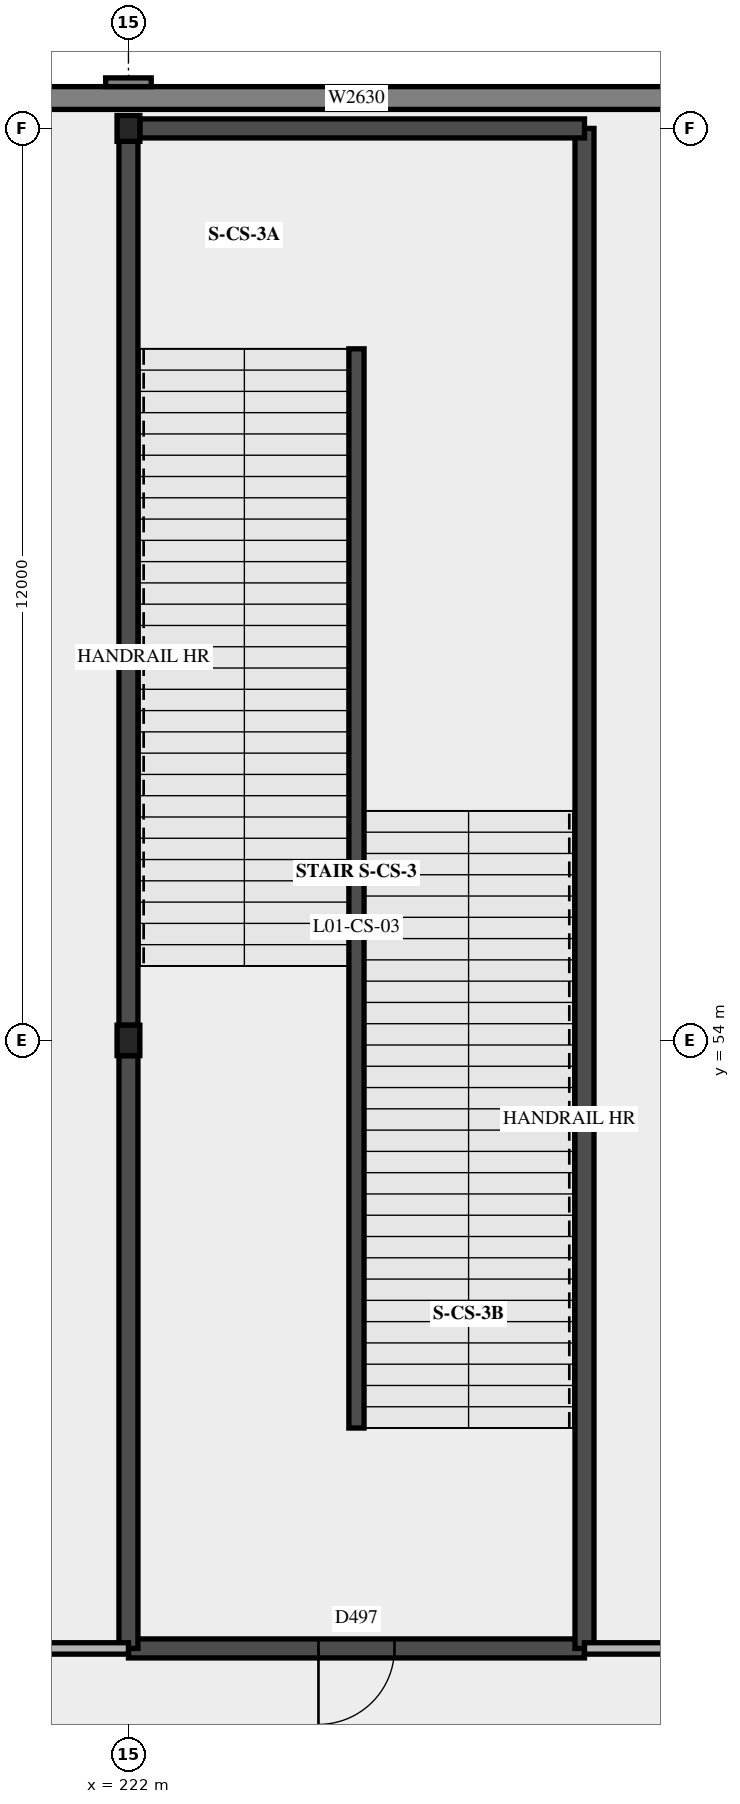
"""IFC4 building model, lengths in metres.
Left out: names, types, materials, properties, quantities, classifications, styles, units other than length and angle.
Written with IfcOpenShell. Run it as: python <this file> out.ifc"""

import sys

from ifc_helpers import new_model, si_unit, direction, frame, frame_2d, origin, origin_2d, place, context, subcontext, project, spatial, polyline, rectangle, i_section, outline, extrude, element, fill, save


model = new_model("IFC4")
c1 = context("Model", 3, precision=1e-05, world=origin(), true_north=direction((0.0, 1.0)))
c2 = subcontext(c1, "Body", "Model", "MODEL_VIEW")
j1 = project(units=[si_unit("LENGTHUNIT", "METRE"), si_unit("PLANEANGLEUNIT", "RADIAN")], contexts=[c1])
p1 = place(None, origin())
s1 = spatial("IfcSite", under=j1, at=p1, CompositionType="ELEMENT")
p2 = place(p1, origin())
s2 = spatial("IfcBuilding", under=s1, at=p2, CompositionType="ELEMENT")
p3 = place(p2, frame((0.0, 0.0, 5.4)))
s3 = spatial("IfcBuildingStorey", under=s2, at=p3, CompositionType="ELEMENT", Elevation=5.4)
p4 = place(p3, frame((222.0, 54.0, 0.0), z_axis=(0.0, 0.0, 1.0), x_axis=(1.0, 0.0, 0.0)))
e1 = element("IfcColumn", 1, at=p4, inside=s3, PredefinedType="COLUMN", context=c2, shape_type="SweptSolid", body=[
    extrude(i_section(OverallWidth=0.3, OverallDepth=0.4, WebThickness=0.013, FlangeThickness=0.024, at=origin_2d()), origin(), (0.0, 0.0, 1.0), 5.4),
])
p5 = place(p3, frame((222.0, 66.0, 0.0), z_axis=(0.0, 0.0, 1.0), x_axis=(1.0, 0.0, 0.0)))
e2 = element("IfcColumn", 2, at=p5, inside=s3, PredefinedType="COLUMN", context=c2, shape_type="SweptSolid", body=[
    extrude(i_section(OverallWidth=0.3, OverallDepth=0.34, WebThickness=0.012, FlangeThickness=0.021, at=origin_2d()), origin(), (0.0, 0.0, 1.0), 5.4),
])
p6 = place(p3, frame((222.0, 46.0, 0.0), z_axis=(0.0, 0.0, 1.0), x_axis=(1.0, 0.0, 0.0)))
e3 = element("IfcWall", 3, at=p6, inside=s3, PredefinedType="SHEAR", context=c2, shape_type="SweptSolid", body=[
    extrude(rectangle(XDim=6.0, YDim=0.25, at=frame_2d((3.0, 0.0))), origin(), (0.0, 0.0, 1.0), 5.4),
])
p7 = place(p6, frame((2.5, 0.0, 0.0)))
e4 = element("IfcOpeningElement", 4, at=p7, cuts=e3, PredefinedType="OPENING", context=c2, shape_type="SweptSolid", body=[
    extrude(rectangle(XDim=1.0, YDim=2.1, at=frame_2d((0.5, 1.05))), frame((0.0, 0.135, 0.0), z_axis=(0.0, -1.0, 0.0), x_axis=(1.0, 0.0, 0.0)), (0.0, 0.0, 1.0), 0.27),
])
p8 = place(p3, frame((228.0, 46.0, 0.0), z_axis=(0.0, 0.0, 1.0), x_axis=(0.0, 1.0, 0.0)))
e5 = element("IfcWall", 5, at=p8, inside=s3, PredefinedType="SHEAR", context=c2, shape_type="SweptSolid", body=[
    extrude(rectangle(XDim=20.0, YDim=0.25, at=frame_2d((10.0, 0.0))), origin(), (0.0, 0.0, 1.0), 5.4),
])
p9 = place(p3, frame((222.15, 66.0, 0.0), z_axis=(0.0, 0.0, 1.0), x_axis=(1.0, 0.0, 0.0)))
e6 = element("IfcWall", 6, at=p9, inside=s3, PredefinedType="SHEAR", context=c2, shape_type="SweptSolid", body=[
    extrude(rectangle(XDim=5.85, YDim=0.25, at=frame_2d((2.925, 0.0))), origin(), (0.0, 0.0, 1.0), 5.4),
])
p10 = place(p3, frame((222.0, 46.0, 0.0), z_axis=(0.0, 0.0, 1.0), x_axis=(0.0, 1.0, 0.0)))
e7 = element("IfcWall", 7, at=p10, inside=s3, PredefinedType="SHEAR", context=c2, shape_type="SweptSolid", body=[
    extrude(rectangle(XDim=7.8, YDim=0.25, at=frame_2d((3.9, 0.0))), origin(), (0.0, 0.0, 1.0), 5.4),
])
p11 = place(p3, frame((222.0, 54.2, 0.0), z_axis=(0.0, 0.0, 1.0), x_axis=(0.0, 1.0, 0.0)))
e8 = element("IfcWall", 8, at=p11, inside=s3, PredefinedType="SHEAR", context=c2, shape_type="SweptSolid", body=[
    extrude(rectangle(XDim=11.63, YDim=0.25, at=frame_2d((5.815, 0.0))), origin(), (0.0, 0.0, 1.0), 5.4),
])
p12 = place(p3, frame((282.25, 66.4, 0.0), z_axis=(0.0, 0.0, 1.0), x_axis=(-1.0, 0.0, 0.0)))
e9 = element("IfcWall", 9, at=p12, inside=s3, PredefinedType="SOLIDWALL", context=c2, shape_type="SweptSolid", body=[
    extrude(rectangle(XDim=84.5, YDim=0.3, at=frame_2d((42.25, 0.0))), origin(), (0.0, 0.0, 1.0), 5.4),
])
p13 = place(p12, frame((9.025, 0.0, 1.8)))
e10 = element("IfcOpeningElement", 10, at=p13, cuts=e9, PredefinedType="OPENING", context=c2, shape_type="SweptSolid", body=[
    extrude(rectangle(XDim=0.45, YDim=2.4, at=frame_2d((0.225, 1.2))), frame((0.0, 0.16, 0.0), z_axis=(0.0, -1.0, 0.0), x_axis=(1.0, 0.0, 0.0)), (0.0, 0.0, 1.0), 0.32),
])
p14 = place(p12, frame((21.025, 0.0, 1.8)))
e11 = element("IfcOpeningElement", 11, at=p14, cuts=e9, PredefinedType="OPENING", context=c2, shape_type="SweptSolid", body=[
    extrude(rectangle(XDim=0.45, YDim=2.4, at=frame_2d((0.225, 1.2))), frame((0.0, 0.16, 0.0), z_axis=(0.0, -1.0, 0.0), x_axis=(1.0, 0.0, 0.0)), (0.0, 0.0, 1.0), 0.32),
])
p15 = place(p12, frame((33.025, 0.0, 1.8)))
e12 = element("IfcOpeningElement", 12, at=p15, cuts=e9, PredefinedType="OPENING", context=c2, shape_type="SweptSolid", body=[
    extrude(rectangle(XDim=0.45, YDim=2.4, at=frame_2d((0.225, 1.2))), frame((0.0, 0.16, 0.0), z_axis=(0.0, -1.0, 0.0), x_axis=(1.0, 0.0, 0.0)), (0.0, 0.0, 1.0), 0.32),
])
p16 = place(p12, frame((45.025, 0.0, 1.8)))
e13 = element("IfcOpeningElement", 13, at=p16, cuts=e9, PredefinedType="OPENING", context=c2, shape_type="SweptSolid", body=[
    extrude(rectangle(XDim=0.45, YDim=2.4, at=frame_2d((0.225, 1.2))), frame((0.0, 0.16, 0.0), z_axis=(0.0, -1.0, 0.0), x_axis=(1.0, 0.0, 0.0)), (0.0, 0.0, 1.0), 0.32),
])
p17 = place(p12, frame((57.025, 0.0, 1.8)))
e14 = element("IfcOpeningElement", 14, at=p17, cuts=e9, PredefinedType="OPENING", context=c2, shape_type="SweptSolid", body=[
    extrude(rectangle(XDim=0.45, YDim=2.4, at=frame_2d((0.225, 1.2))), frame((0.0, 0.16, 0.0), z_axis=(0.0, -1.0, 0.0), x_axis=(1.0, 0.0, 0.0)), (0.0, 0.0, 1.0), 0.32),
])
p18 = place(p12, frame((69.025, 0.0, 1.8)))
e15 = element("IfcOpeningElement", 15, at=p18, cuts=e9, PredefinedType="OPENING", context=c2, shape_type="SweptSolid", body=[
    extrude(rectangle(XDim=0.45, YDim=2.4, at=frame_2d((0.225, 1.2))), frame((0.0, 0.16, 0.0), z_axis=(0.0, -1.0, 0.0), x_axis=(1.0, 0.0, 0.0)), (0.0, 0.0, 1.0), 0.32),
])
p19 = place(p12, frame((81.025, 0.0, 1.8)))
e16 = element("IfcOpeningElement", 16, at=p19, cuts=e9, PredefinedType="OPENING", context=c2, shape_type="SweptSolid", body=[
    extrude(rectangle(XDim=0.45, YDim=2.4, at=frame_2d((0.225, 1.2))), frame((0.0, 0.16, 0.0), z_axis=(0.0, -1.0, 0.0), x_axis=(1.0, 0.0, 0.0)), (0.0, 0.0, 1.0), 0.32),
])
p20 = place(p3, frame((222.3, 66.607, 0.0), z_axis=(0.0, 0.0, 1.0), x_axis=(-1.0, 0.0, 0.0)))
e17 = element("IfcWall", 17, at=p20, inside=s3, PredefinedType="SOLIDWALL", context=c2, shape_type="SweptSolid", body=[
    extrude(rectangle(XDim=0.6, YDim=0.115, at=frame_2d((0.3, 0.0))), origin(), (0.0, 0.0, 1.0), 5.4),
])
p21 = place(p3, frame((225.0, 48.9, 0.0), z_axis=(0.0, 0.0, 1.0), x_axis=(0.0, 1.0, 0.0)))
e18 = element("IfcWall", 18, at=p21, inside=s3, PredefinedType="SHEAR", context=c2, shape_type="SweptSolid", body=[
    extrude(rectangle(XDim=14.2, YDim=0.2, at=frame_2d((7.1, 0.0))), origin(), (0.0, 0.0, 1.0), 5.15),
])
p22 = place(p3, frame((210.0, 46.0, 0.0), z_axis=(0.0, 0.0, 1.0), x_axis=(1.0, 0.0, 0.0)))
e19 = element("IfcWall", 19, at=p22, inside=s3, PredefinedType="PARTITIONING", context=c2, shape_type="SweptSolid", body=[
    extrude(outline(polyline([(0.0, 0.0), (12.0, 0.0), (12.0, 5.15), (9.705, 5.15), (9.7, 4.63), (9.5, 4.63), (9.495, 5.15), (7.305, 5.15), (7.3, 4.63), (7.1, 4.63), (7.095, 5.15), (4.905, 5.15), (4.9, 4.63), (4.7, 4.63), (4.695, 5.15), (2.505, 5.15), (2.5, 4.63), (2.3, 4.63), (2.295, 5.15), (0.1, 5.15), (0.095, 4.68), (0.0, 4.68), (0.0, 0.0)])), frame((0.0, 0.075, 0.0), z_axis=(0.0, -1.0, 0.0), x_axis=(1.0, 0.0, 0.0)), (0.0, 0.0, 1.0), 0.15),
])
p23 = place(p22, frame((5.4, 0.0, 0.0)))
e20 = element("IfcOpeningElement", 20, at=p23, cuts=e19, PredefinedType="OPENING", context=c2, shape_type="SweptSolid", body=[
    extrude(rectangle(XDim=1.2, YDim=2.4, at=frame_2d((0.6, 1.2))), frame((0.0, 0.085, 0.0), z_axis=(0.0, -1.0, 0.0), x_axis=(1.0, 0.0, 0.0)), (0.0, 0.0, 1.0), 0.17),
])
p24 = place(p3, frame((228.0, 46.0, 0.0), z_axis=(0.0, 0.0, 1.0), x_axis=(1.0, 0.0, 0.0)))
e21 = element("IfcWall", 21, at=p24, inside=s3, PredefinedType="PARTITIONING", context=c2, shape_type="SweptSolid", body=[
    extrude(outline(polyline([(0.0, 0.0), (18.0, 0.0), (18.0, 5.15), (15.705, 5.15), (15.7, 4.63), (15.5, 4.63), (15.495, 5.15), (13.305, 5.15), (13.3, 4.63), (13.1, 4.63), (13.095, 5.15), (10.905, 5.15), (10.9, 4.63), (10.7, 4.63), (10.695, 5.15), (8.505, 5.15), (8.5, 4.63), (8.3, 4.63), (8.295, 5.15), (6.1, 5.15), (6.095, 4.68), (5.905, 4.68), (5.9, 5.15), (3.705, 5.15), (3.7, 4.63), (3.5, 4.63), (3.495, 5.15), (1.305, 5.15), (1.3, 4.63), (1.1, 4.63), (1.095, 5.15), (0.0, 5.15), (0.0, 0.0)])), frame((0.0, 0.075, 0.0), z_axis=(0.0, -1.0, 0.0), x_axis=(1.0, 0.0, 0.0)), (0.0, 0.0, 1.0), 0.15),
])
p25 = place(p24, frame((8.4, 0.0, 0.0)))
e22 = element("IfcOpeningElement", 22, at=p25, cuts=e21, PredefinedType="OPENING", context=c2, shape_type="SweptSolid", body=[
    extrude(rectangle(XDim=1.2, YDim=2.4, at=frame_2d((0.6, 1.2))), frame((0.0, 0.085, 0.0), z_axis=(0.0, -1.0, 0.0), x_axis=(1.0, 0.0, 0.0)), (0.0, 0.0, 1.0), 0.17),
])
p26 = place(p17, origin())
e23 = element("IfcWindow", 23, at=p26, inside=s3, PartitioningType="SINGLE_PANEL", PredefinedType="WINDOW", context=c2, shape_type="SweptSolid", body=[
    extrude(rectangle(XDim=0.45, YDim=2.4, at=frame_2d((0.225, 1.2))), frame((0.0, 0.03, 0.0), z_axis=(0.0, -1.0, 0.0), x_axis=(1.0, 0.0, 0.0)), (0.0, 0.0, 1.0), 0.06),
])
fill(e14, e23)
p27 = place(p7, origin())
e24 = element("IfcDoor", 24, at=p27, inside=s3, OperationType="SINGLE_SWING_RIGHT", PredefinedType="DOOR", context=c2, shape_type="SweptSolid", body=[
    extrude(rectangle(XDim=1.0, YDim=2.1, at=frame_2d((0.5, 1.05))), frame((0.0, 0.025, 0.0), z_axis=(0.0, -1.0, 0.0), x_axis=(1.0, 0.0, 0.0)), (0.0, 0.0, 1.0), 0.05),
])
fill(e4, e24)
save(model, sys.argv[1])
